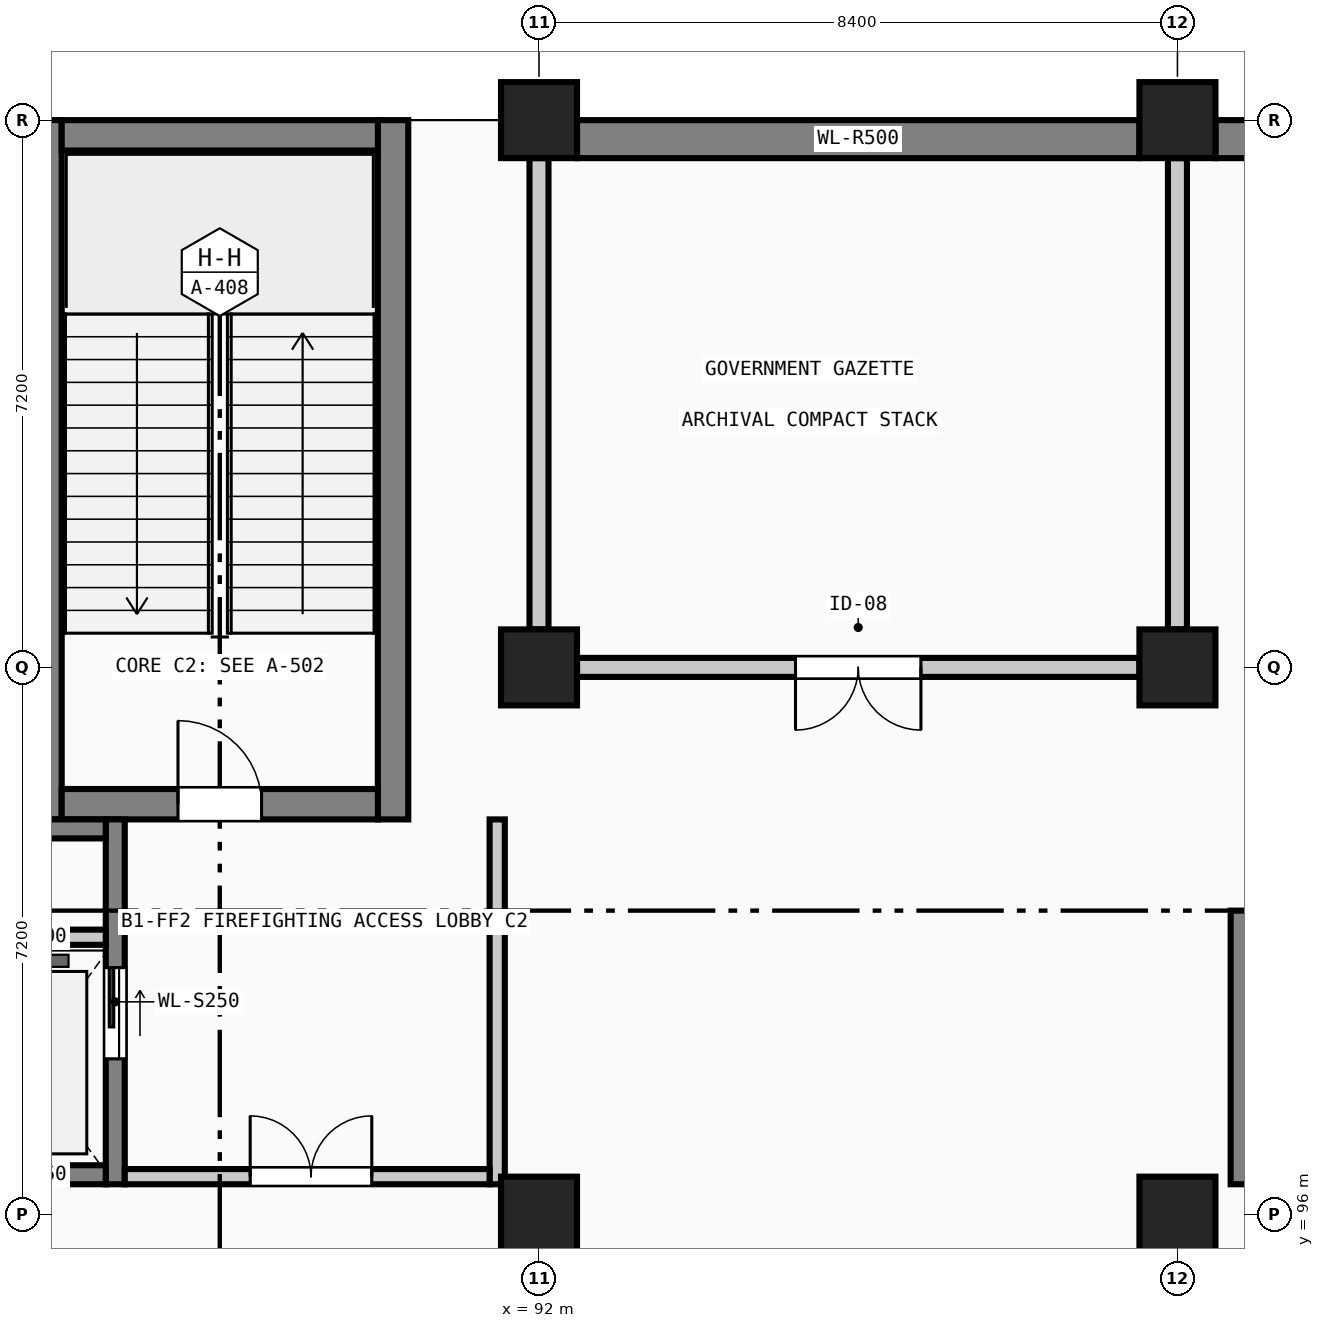
"""IFC4 building model, lengths in metres.
Left out: names, types, materials, properties, quantities, classifications, styles, units other than length and angle.
Written with IfcOpenShell. Run it as: python <this file> out.ifc"""

import sys

from ifc_helpers import new_model, si_unit, direction, frame, frame_2d, origin, origin_2d, place, context, subcontext, project, spatial, rectangle, extrude, element, fill, save


model = new_model("IFC4")
c1 = context("Model", 3, precision=1e-05, world=origin(), true_north=direction((0.0, 1.0)))
c2 = subcontext(c1, "Body", "Model", "MODEL_VIEW")
j1 = project(units=[si_unit("LENGTHUNIT", "METRE"), si_unit("PLANEANGLEUNIT", "RADIAN")], contexts=[c1])
p1 = place(None, origin())
s1 = spatial("IfcSite", under=j1, at=p1, CompositionType="ELEMENT")
p2 = place(p1, origin())
s2 = spatial("IfcBuilding", under=s1, at=p2, CompositionType="ELEMENT")
p3 = place(p2, frame((0.0, 0.0, -4.8)))
s3 = spatial("IfcBuildingStorey", under=s2, at=p3, CompositionType="ELEMENT", Elevation=-4.8)
for number, where, z_axis, x_axis in (
    (1, (92.0, 96.0, 0.0), (0.0, 0.0, 1.0), (1.0, 0.0, 0.0)),
    (2, (92.0, 103.2, 0.0), (0.0, 0.0, 1.0), (1.0, 0.0, 0.0)),
    (3, (92.0, 110.4, 0.0), (0.0, 0.0, 1.0), (1.0, 0.0, 0.0)),
    (4, (100.4, 96.0, 0.0), (0.0, 0.0, 1.0), (1.0, 0.0, 0.0)),
    (5, (100.4, 103.2, 0.0), (0.0, 0.0, 1.0), (1.0, 0.0, 0.0)),
    (6, (100.4, 110.4, 0.0), (0.0, 0.0, 1.0), (1.0, 0.0, 0.0)),
):
    element("IfcColumn", number, at=place(p3, frame(where, z_axis=z_axis, x_axis=x_axis)), inside=s3, PredefinedType="COLUMN", context=c2, shape_type="SweptSolid", body=[
        extrude(rectangle(XDim=1.0, YDim=1.0, at=origin_2d()), origin(), (0.0, 0.0, 1.0), 4.8),
    ])
for number, where, z_axis, x_axis in (
    (7, (85.52, 101.2, 0.0), (0.0, 0.0, 1.0), (0.0, 1.0, 0.0)),
    (8, (90.08, 110.4, 0.0), (0.0, 0.0, 1.0), (0.0, -1.0, 0.0)),
):
    element("IfcWall", number, at=place(p3, frame(where, z_axis=z_axis, x_axis=x_axis)), inside=s3, PredefinedType="SHEAR", context=c2, shape_type="SweptSolid", body=[
        extrude(rectangle(XDim=9.2, YDim=0.4, at=frame_2d((4.6, 0.0))), origin(), (0.0, 0.0, 1.0), 4.5),
    ])
p4 = place(p3, frame((89.88, 101.4, 0.0), z_axis=(0.0, 0.0, 1.0), x_axis=(-1.0, 0.0, 0.0)))
e9 = element("IfcWall", 9, at=p4, inside=s3, PredefinedType="SHEAR", context=c2, shape_type="SweptSolid", body=[
    extrude(rectangle(XDim=4.16, YDim=0.4, at=frame_2d((2.08, 0.0))), origin(), (0.0, 0.0, 1.0), 4.5),
])
p5 = place(p4, frame((1.53, 0.0, 0.0)))
e10 = element("IfcOpeningElement", 10, at=p5, cuts=e9, PredefinedType="OPENING", context=c2, shape_type="SweptSolid", body=[
    extrude(rectangle(XDim=1.1, YDim=2.2, at=frame_2d((0.55, 1.1))), frame((0.0, 0.21, 0.0), z_axis=(0.0, -1.0, 0.0), x_axis=(1.0, 0.0, 0.0)), (0.0, 0.0, 1.0), 0.42),
])
p6 = place(p3, frame((85.72, 110.2, 0.0), z_axis=(0.0, 0.0, 1.0), x_axis=(1.0, 0.0, 0.0)))
e11 = element("IfcWall", 11, at=p6, inside=s3, PredefinedType="SHEAR", context=c2, shape_type="SweptSolid", body=[
    extrude(rectangle(XDim=4.16, YDim=0.4, at=frame_2d((2.08, 0.0))), origin(), (0.0, 0.0, 1.0), 4.5),
])
p7 = place(p3, frame((86.425, 101.2, 0.0), z_axis=(0.0, 0.0, 1.0), x_axis=(0.0, -1.0, 0.0)))
e12 = element("IfcWall", 12, at=p7, inside=s3, PredefinedType="SOLIDWALL", context=c2, shape_type="SweptSolid", body=[
    extrude(rectangle(XDim=4.8, YDim=0.25, at=frame_2d((2.4, 0.0))), origin(), (0.0, 0.0, 1.0), 4.5),
])
p8 = place(p7, frame((1.95, 0.0, 0.0)))
e13 = element("IfcOpeningElement", 13, at=p8, cuts=e12, PredefinedType="OPENING", context=c2, shape_type="SweptSolid", body=[
    extrude(rectangle(XDim=1.2, YDim=2.2, at=frame_2d((0.6, 1.1))), frame((0.0, 0.135, 0.0), z_axis=(0.0, -1.0, 0.0), x_axis=(1.0, 0.0, 0.0)), (0.0, 0.0, 1.0), 0.27),
])
for number, where, z_axis, x_axis in (
    (14, (86.3, 96.525, 0.0), (0.0, 0.0, 1.0), (-1.0, 0.0, 0.0)),
    (15, (84.2, 101.075, 0.0), (0.0, 0.0, 1.0), (1.0, 0.0, 0.0)),
):
    element("IfcWall", number, at=place(p3, frame(where, z_axis=z_axis, x_axis=x_axis)), inside=s3, PredefinedType="SOLIDWALL", context=c2, shape_type="SweptSolid", body=[
        extrude(rectangle(XDim=2.1, YDim=0.25, at=frame_2d((1.05, 0.0))), origin(), (0.0, 0.0, 1.0), 4.5),
    ])
p9 = place(p3, frame((84.2, 99.65, 0.0), z_axis=(0.0, 0.0, 1.0), x_axis=(1.0, 0.0, 0.0)))
e16 = element("IfcWall", 16, at=p9, inside=s3, PredefinedType="SOLIDWALL", context=c2, shape_type="SweptSolid", body=[
    extrude(rectangle(XDim=2.1, YDim=0.2, at=frame_2d((1.05, 0.0))), origin(), (0.0, 0.0, 1.0), 4.5),
])
p10 = place(p3, frame((91.45, 101.2, 0.0), z_axis=(0.0, 0.0, 1.0), x_axis=(0.0, -1.0, 0.0)))
e17 = element("IfcWall", 17, at=p10, inside=s3, PredefinedType="SOLIDWALL", context=c2, shape_type="SweptSolid", body=[
    extrude(rectangle(XDim=4.8, YDim=0.2, at=frame_2d((2.4, 0.0))), origin(), (0.0, 0.0, 1.0), 4.5),
])
p11 = place(p3, frame((91.35, 96.5, 0.0), z_axis=(0.0, 0.0, 1.0), x_axis=(-1.0, 0.0, 0.0)))
e18 = element("IfcWall", 18, at=p11, inside=s3, PredefinedType="SOLIDWALL", context=c2, shape_type="SweptSolid", body=[
    extrude(rectangle(XDim=4.8, YDim=0.2, at=frame_2d((2.4, 0.0))), origin(), (0.0, 0.0, 1.0), 4.5),
])
p12 = place(p11, frame((1.55, 0.0, 0.0)))
e19 = element("IfcOpeningElement", 19, at=p12, cuts=e18, PredefinedType="OPENING", context=c2, shape_type="SweptSolid", body=[
    extrude(rectangle(XDim=1.6, YDim=2.2, at=frame_2d((0.8, 1.1))), frame((0.0, 0.11, 0.0), z_axis=(0.0, -1.0, 0.0), x_axis=(1.0, 0.0, 0.0)), (0.0, 0.0, 1.0), 0.22),
])
p13 = place(p3, frame((101.225, 96.4, 0.0), z_axis=(0.0, 0.0, 1.0), x_axis=(0.0, 1.0, 0.0)))
e20 = element("IfcWall", 20, at=p13, inside=s3, PredefinedType="SOLIDWALL", context=c2, shape_type="SweptSolid", body=[
    extrude(rectangle(XDim=3.6, YDim=0.25, at=frame_2d((1.8, 0.0))), origin(), (0.0, 0.0, 1.0), 4.5),
])
p14 = place(p3, frame((92.5, 110.15, 0.0), z_axis=(0.0, 0.0, 1.0), x_axis=(1.0, 0.0, 0.0)))
e21 = element("IfcWall", 21, at=p14, inside=s3, PredefinedType="USERDEFINED", context=c2, shape_type="SweptSolid", body=[
    extrude(rectangle(XDim=7.4, YDim=0.5, at=frame_2d((3.7, 0.0))), origin(), (0.0, 0.0, 1.0), 4.5),
])
p15 = place(p3, frame((100.9, 110.15, 0.0), z_axis=(0.0, 0.0, 1.0), x_axis=(1.0, 0.0, 0.0)))
e22 = element("IfcWall", 22, at=p15, inside=s3, PredefinedType="USERDEFINED", context=c2, shape_type="SweptSolid", body=[
    extrude(rectangle(XDim=7.4, YDim=0.5, at=frame_2d((3.7, 0.0))), origin(), (0.0, 0.0, 1.0), 4.5),
])
p16 = place(p3, frame((99.9, 103.2, 0.0), z_axis=(0.0, 0.0, 1.0), x_axis=(-1.0, 0.0, 0.0)))
e23 = element("IfcWall", 23, at=p16, inside=s3, PredefinedType="SOLIDWALL", context=c2, shape_type="SweptSolid", body=[
    extrude(rectangle(XDim=7.4, YDim=0.25, at=frame_2d((3.7, 0.0))), origin(), (0.0, 0.0, 1.0), 3.75),
])
p17 = place(p16, frame((2.875, 0.0, 0.0)))
e24 = element("IfcOpeningElement", 24, at=p17, cuts=e23, PredefinedType="OPENING", context=c2, shape_type="SweptSolid", body=[
    extrude(rectangle(XDim=1.65, YDim=2.25, at=frame_2d((0.825, 1.125))), frame((0.0, 0.135, 0.0), z_axis=(0.0, -1.0, 0.0), x_axis=(1.0, 0.0, 0.0)), (0.0, 0.0, 1.0), 0.27),
])
for number, where, z_axis, x_axis in (
    (25, (92.0, 103.7, 0.0), (0.0, 0.0, 1.0), (0.0, 1.0, 0.0)),
    (26, (100.4, 109.9, 0.0), (0.0, 0.0, 1.0), (0.0, -1.0, 0.0)),
):
    element("IfcWall", number, at=place(p3, frame(where, z_axis=z_axis, x_axis=x_axis)), inside=s3, PredefinedType="SOLIDWALL", context=c2, shape_type="SweptSolid", body=[
        extrude(rectangle(XDim=6.2, YDim=0.25, at=frame_2d((3.1, 0.0))), origin(), (0.0, 0.0, 1.0), 3.85),
    ])
p18 = place(p5, frame((1.1, 0.0, 0.0), z_axis=(0.0, 0.0, 1.0), x_axis=(-1.0, 0.0, 0.0)))
e27 = element("IfcDoor", 27, at=p18, inside=s3, OperationType="SINGLE_SWING_LEFT", PredefinedType="DOOR", context=c2, shape_type="SweptSolid", body=[
    extrude(rectangle(XDim=1.1, YDim=2.2, at=frame_2d((0.55, 1.1))), frame((0.0, 0.025, 0.0), z_axis=(0.0, -1.0, 0.0), x_axis=(1.0, 0.0, 0.0)), (0.0, 0.0, 1.0), 0.05),
])
fill(e10, e27)
p19 = place(p8, origin())
e28 = element("IfcDoor", 28, at=p19, inside=s3, OperationType="SLIDING_TO_LEFT", PredefinedType="DOOR", context=c2, shape_type="SweptSolid", body=[
    extrude(rectangle(XDim=1.2, YDim=2.2, at=frame_2d((0.6, 1.1))), frame((0.0, 0.025, 0.0), z_axis=(0.0, -1.0, 0.0), x_axis=(1.0, 0.0, 0.0)), (0.0, 0.0, 1.0), 0.05),
])
fill(e13, e28)
p20 = place(p12, frame((1.6, 0.0, 0.0), z_axis=(0.0, 0.0, 1.0), x_axis=(-1.0, 0.0, 0.0)))
e29 = element("IfcDoor", 29, at=p20, inside=s3, OperationType="DOUBLE_DOOR_SINGLE_SWING", PredefinedType="DOOR", context=c2, shape_type="SweptSolid", body=[
    extrude(rectangle(XDim=1.6, YDim=2.2, at=frame_2d((0.8, 1.1))), frame((0.0, 0.025, 0.0), z_axis=(0.0, -1.0, 0.0), x_axis=(1.0, 0.0, 0.0)), (0.0, 0.0, 1.0), 0.05),
])
fill(e19, e29)
p21 = place(p17, origin())
e30 = element("IfcDoor", 30, at=p21, inside=s3, OperationType="DOUBLE_DOOR_SINGLE_SWING", PredefinedType="DOOR", context=c2, shape_type="SweptSolid", body=[
    extrude(rectangle(XDim=1.65, YDim=2.25, at=frame_2d((0.825, 1.125))), frame((0.0, 0.025, 0.0), z_axis=(0.0, -1.0, 0.0), x_axis=(1.0, 0.0, 0.0)), (0.0, 0.0, 1.0), 0.05),
])
fill(e24, e30)
save(model, sys.argv[1])
